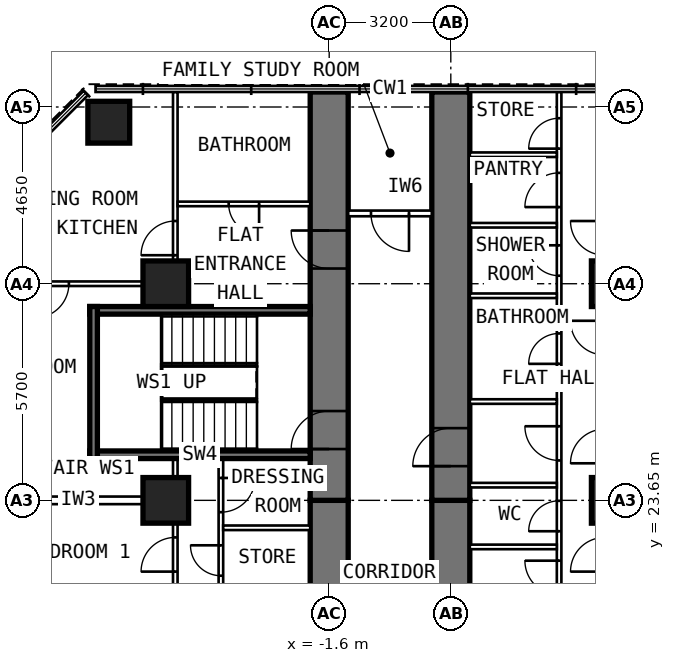
"""IFC4 building model, lengths in metres.
Left out: names, types, materials, properties, quantities, classifications, styles, units other than length and angle.
Written with IfcOpenShell. Run it as: python <this file> out.ifc"""

import sys

from ifc_helpers import new_model, si_unit, direction, frame, frame_2d, origin, origin_2d, place, context, subcontext, project, spatial, rectangle, extrude, element, fill, save


model = new_model("IFC4")
c1 = context("Model", 3, precision=1e-05, world=origin(), true_north=direction((0.0, 1.0)))
c2 = subcontext(c1, "Body", "Model", "MODEL_VIEW")
j1 = project(units=[si_unit("LENGTHUNIT", "METRE"), si_unit("PLANEANGLEUNIT", "RADIAN")], contexts=[c1])
p1 = place(None, origin())
s1 = spatial("IfcSite", under=j1, at=p1, CompositionType="ELEMENT")
p2 = place(p1, origin())
s2 = spatial("IfcBuilding", under=s1, at=p2, CompositionType="ELEMENT")
p3 = place(p2, frame((0.0, 0.0, 28.8)))
s3 = spatial("IfcBuildingStorey", under=s2, at=p3, CompositionType="ELEMENT", Elevation=28.8)
p4 = place(p3, frame((-7.4, 33.6, 0.0), z_axis=(0.0, 0.0, 1.0), x_axis=(0.0, 1.0, 0.0)))
e1 = element("IfcColumn", 1, at=p4, inside=s3, PredefinedType="COLUMN", context=c2, shape_type="SweptSolid", body=[
    extrude(rectangle(XDim=1.1, YDim=1.1, at=origin_2d()), origin(), (0.0, 0.0, 1.0), 3.6),
])
for number, where, z_axis, x_axis in (
    (2, (-5.9, 23.65, 0.0), (0.0, 0.0, 1.0), (0.0, 1.0, 0.0)),
    (3, (-5.9, 29.35, 0.0), (0.0, 0.0, 1.0), (0.0, 1.0, 0.0)),
    (4, (5.9, 23.65, 0.0), (0.0, 0.0, 1.0), (0.0, 1.0, 0.0)),
    (5, (5.9, 29.35, 0.0), (0.0, 0.0, 1.0), (0.0, 1.0, 0.0)),
):
    element("IfcColumn", number, at=place(p3, frame(where, z_axis=z_axis, x_axis=x_axis)), inside=s3, PredefinedType="COLUMN", context=c2, shape_type="SweptSolid", body=[
        extrude(rectangle(XDim=1.2, YDim=1.2, at=origin_2d()), origin(), (0.0, 0.0, 1.0), 3.6),
    ])
p5 = place(p3, frame((-1.6, 17.95, 0.0), z_axis=(0.0, 0.0, 1.0), x_axis=(0.0, 1.0, 0.0)))
e6 = element("IfcWall", 6, at=p5, inside=s3, PredefinedType="SHEAR", context=c2, shape_type="SweptSolid", body=[
    extrude(rectangle(XDim=5.7, YDim=1.0, at=frame_2d((2.85, 0.0))), origin(), (0.0, 0.0, 1.0), 3.6),
])
p6 = place(p3, frame((-1.6, 23.65, 0.0), z_axis=(0.0, 0.0, 1.0), x_axis=(0.0, 1.0, 0.0)))
e7 = element("IfcWall", 7, at=p6, inside=s3, PredefinedType="SHEAR", context=c2, shape_type="SweptSolid", body=[
    extrude(rectangle(XDim=10.745, YDim=1.0, at=frame_2d((5.373, 0.0))), origin(), (0.0, 0.0, 1.0), 3.6),
])
p7 = place(p6, frame((6.1, 0.0, 0.0)))
e8 = element("IfcOpeningElement", 8, at=p7, cuts=e7, PredefinedType="OPENING", context=c2, shape_type="SweptSolid", body=[
    extrude(rectangle(XDim=1.0, YDim=2.1, at=frame_2d((0.5, 1.05))), frame((0.0, 0.512, 0.0), z_axis=(0.0, -1.0, 0.0), x_axis=(1.0, 0.0, 0.0)), (0.0, 0.0, 1.0), 1.024),
])
p8 = place(p6, frame((1.35, 0.0, 0.0)))
e9 = element("IfcOpeningElement", 9, at=p8, cuts=e7, PredefinedType="OPENING", context=c2, shape_type="SweptSolid", body=[
    extrude(rectangle(XDim=1.0, YDim=2.1, at=frame_2d((0.5, 1.05))), frame((0.0, 0.512, 0.0), z_axis=(0.0, -1.0, 0.0), x_axis=(1.0, 0.0, 0.0)), (0.0, 0.0, 1.0), 1.024),
])
p9 = place(p3, frame((1.6, 17.95, 0.0), z_axis=(0.0, 0.0, 1.0), x_axis=(0.0, 1.0, 0.0)))
e10 = element("IfcWall", 10, at=p9, inside=s3, PredefinedType="SHEAR", context=c2, shape_type="SweptSolid", body=[
    extrude(rectangle(XDim=5.7, YDim=1.0, at=frame_2d((2.85, 0.0))), origin(), (0.0, 0.0, 1.0), 3.6),
])
p10 = place(p3, frame((1.6, 23.65, 0.0), z_axis=(0.0, 0.0, 1.0), x_axis=(0.0, 1.0, 0.0)))
e11 = element("IfcWall", 11, at=p10, inside=s3, PredefinedType="SHEAR", context=c2, shape_type="SweptSolid", body=[
    extrude(rectangle(XDim=10.745, YDim=1.0, at=frame_2d((5.373, 0.0))), origin(), (0.0, 0.0, 1.0), 3.6),
])
p11 = place(p10, frame((0.9, 0.0, 0.0)))
e12 = element("IfcOpeningElement", 12, at=p11, cuts=e11, PredefinedType="OPENING", context=c2, shape_type="SweptSolid", body=[
    extrude(rectangle(XDim=1.0, YDim=2.1, at=frame_2d((0.5, 1.05))), frame((0.0, 0.512, 0.0), z_axis=(0.0, -1.0, 0.0), x_axis=(1.0, 0.0, 0.0)), (0.0, 0.0, 1.0), 1.024),
])
p12 = place(p3, frame((-4.45, 10.1, 0.0), z_axis=(0.0, 0.0, 1.0), x_axis=(0.0, 1.0, 0.0)))
e13 = element("IfcWall", 13, at=p12, inside=s3, PredefinedType="PARTITIONING", context=c2, shape_type="SweptSolid", body=[
    extrude(rectangle(XDim=14.65, YDim=0.12, at=frame_2d((7.325, 0.0))), origin(), (0.0, 0.0, 1.0), 3.3),
])
p13 = place(p12, frame((1.54, 0.0, 0.0)))
e14 = element("IfcOpeningElement", 14, at=p13, cuts=e13, PredefinedType="OPENING", context=c2, shape_type="SweptSolid", body=[
    extrude(rectangle(XDim=0.9, YDim=2.1, at=frame_2d((0.45, 1.05))), frame((0.0, 0.072, 0.0), z_axis=(0.0, -1.0, 0.0), x_axis=(1.0, 0.0, 0.0)), (0.0, 0.0, 1.0), 0.144),
])
p14 = place(p12, frame((3.53, 0.0, 0.0)))
e15 = element("IfcOpeningElement", 15, at=p14, cuts=e13, PredefinedType="OPENING", context=c2, shape_type="SweptSolid", body=[
    extrude(rectangle(XDim=0.9, YDim=2.1, at=frame_2d((0.45, 1.05))), frame((0.0, 0.072, 0.0), z_axis=(0.0, -1.0, 0.0), x_axis=(1.0, 0.0, 0.0)), (0.0, 0.0, 1.0), 0.144),
])
p15 = place(p12, frame((5.971, 0.0, 0.0)))
e16 = element("IfcOpeningElement", 16, at=p15, cuts=e13, PredefinedType="OPENING", context=c2, shape_type="SweptSolid", body=[
    extrude(rectangle(XDim=0.8, YDim=2.1, at=frame_2d((0.4, 1.05))), frame((0.0, 0.072, 0.0), z_axis=(0.0, -1.0, 0.0), x_axis=(1.0, 0.0, 0.0)), (0.0, 0.0, 1.0), 0.144),
])
p16 = place(p12, frame((8.074, 0.0, 0.0)))
e17 = element("IfcOpeningElement", 17, at=p16, cuts=e13, PredefinedType="OPENING", context=c2, shape_type="SweptSolid", body=[
    extrude(rectangle(XDim=0.9, YDim=2.1, at=frame_2d((0.45, 1.05))), frame((0.0, 0.072, 0.0), z_axis=(0.0, -1.0, 0.0), x_axis=(1.0, 0.0, 0.0)), (0.0, 0.0, 1.0), 0.144),
])
p17 = place(p12, frame((9.845, 0.0, 0.0)))
e18 = element("IfcOpeningElement", 18, at=p17, cuts=e13, PredefinedType="OPENING", context=c2, shape_type="SweptSolid", body=[
    extrude(rectangle(XDim=0.8, YDim=2.1, at=frame_2d((0.4, 1.05))), frame((0.0, 0.072, 0.0), z_axis=(0.0, -1.0, 0.0), x_axis=(1.0, 0.0, 0.0)), (0.0, 0.0, 1.0), 0.144),
])
p18 = place(p12, frame((11.567, 0.0, 0.0)))
e19 = element("IfcOpeningElement", 19, at=p18, cuts=e13, PredefinedType="OPENING", context=c2, shape_type="SweptSolid", body=[
    extrude(rectangle(XDim=0.8, YDim=2.1, at=frame_2d((0.4, 1.05))), frame((0.0, 0.072, 0.0), z_axis=(0.0, -1.0, 0.0), x_axis=(1.0, 0.0, 0.0)), (0.0, 0.0, 1.0), 0.144),
])
p19 = place(p12, frame((13.239, 0.0, 0.0)))
e20 = element("IfcOpeningElement", 20, at=p19, cuts=e13, PredefinedType="OPENING", context=c2, shape_type="SweptSolid", body=[
    extrude(rectangle(XDim=0.9, YDim=2.1, at=frame_2d((0.45, 1.05))), frame((0.0, 0.072, 0.0), z_axis=(0.0, -1.0, 0.0), x_axis=(1.0, 0.0, 0.0)), (0.0, 0.0, 1.0), 0.144),
])
p20 = place(p3, frame((-5.65, 9.6, 0.0), z_axis=(0.0, 0.0, 1.0), x_axis=(0.0, 1.0, 0.0)))
e21 = element("IfcWall", 21, at=p20, inside=s3, PredefinedType="PARTITIONING", context=c2, shape_type="SweptSolid", body=[
    extrude(rectangle(XDim=15.15, YDim=0.12, at=frame_2d((7.575, 0.0))), origin(), (0.0, 0.0, 1.0), 3.3),
])
p21 = place(p20, frame((5.05, 0.0, 0.0)))
e22 = element("IfcOpeningElement", 22, at=p21, cuts=e21, PredefinedType="OPENING", context=c2, shape_type="SweptSolid", body=[
    extrude(rectangle(XDim=0.9, YDim=2.1, at=frame_2d((0.45, 1.05))), frame((0.0, 0.072, 0.0), z_axis=(0.0, -1.0, 0.0), x_axis=(1.0, 0.0, 0.0)), (0.0, 0.0, 1.0), 0.144),
])
p22 = place(p20, frame((9.325, 0.0, 0.0)))
e23 = element("IfcOpeningElement", 23, at=p22, cuts=e21, PredefinedType="OPENING", context=c2, shape_type="SweptSolid", body=[
    extrude(rectangle(XDim=0.9, YDim=2.1, at=frame_2d((0.45, 1.05))), frame((0.0, 0.072, 0.0), z_axis=(0.0, -1.0, 0.0), x_axis=(1.0, 0.0, 0.0)), (0.0, 0.0, 1.0), 0.144),
])
p23 = place(p20, frame((12.175, 0.0, 0.0)))
e24 = element("IfcOpeningElement", 24, at=p23, cuts=e21, PredefinedType="OPENING", context=c2, shape_type="SweptSolid", body=[
    extrude(rectangle(XDim=0.9, YDim=2.1, at=frame_2d((0.45, 1.05))), frame((0.0, 0.072, 0.0), z_axis=(0.0, -1.0, 0.0), x_axis=(1.0, 0.0, 0.0)), (0.0, 0.0, 1.0), 0.144),
])
p24 = place(p3, frame((-2.1, 22.928, 0.0), z_axis=(0.0, 0.0, 1.0), x_axis=(-1.0, 0.0, 0.0)))
e25 = element("IfcWall", 25, at=p24, inside=s3, PredefinedType="PARTITIONING", context=c2, shape_type="SweptSolid", body=[
    extrude(rectangle(XDim=2.29, YDim=0.12, at=frame_2d((1.145, 0.0))), origin(), (0.0, 0.0, 1.0), 3.3),
])
p25 = place(p3, frame((-5.71, 23.65, 0.0), z_axis=(0.0, 0.0, 1.0), x_axis=(-1.0, 0.0, 0.0)))
e26 = element("IfcWall", 26, at=p25, inside=s3, PredefinedType="PARTITIONING", context=c2, shape_type="SweptSolid", body=[
    extrude(rectangle(XDim=4.99, YDim=0.2, at=frame_2d((2.495, 0.0))), origin(), (0.0, 0.0, 1.0), 3.3),
])
p26 = place(p3, frame((-5.71, 29.35, 0.0), z_axis=(0.0, 0.0, 1.0), x_axis=(-1.0, 0.0, 0.0)))
e27 = element("IfcWall", 27, at=p26, inside=s3, PredefinedType="PARTITIONING", context=c2, shape_type="SweptSolid", body=[
    extrude(rectangle(XDim=4.99, YDim=0.12, at=frame_2d((2.495, 0.0))), origin(), (0.0, 0.0, 1.0), 2.3),
])
p27 = place(p26, frame((2.74, 0.0, 0.0)))
e28 = element("IfcOpeningElement", 28, at=p27, cuts=e27, PredefinedType="OPENING", context=c2, shape_type="SweptSolid", body=[
    extrude(rectangle(XDim=0.9, YDim=2.1, at=frame_2d((0.45, 1.05))), frame((0.0, 0.072, 0.0), z_axis=(0.0, -1.0, 0.0), x_axis=(1.0, 0.0, 0.0)), (0.0, 0.0, 1.0), 0.144),
])
p28 = place(p3, frame((-5.65, 28.95, 0.0), z_axis=(0.0, 0.0, 1.0), x_axis=(0.0, 1.0, 0.0)))
e29 = element("IfcWall", 29, at=p28, inside=s3, PredefinedType="PARTITIONING", context=c2, shape_type="SweptSolid", body=[
    extrude(rectangle(XDim=5.445, YDim=0.12, at=frame_2d((2.723, 0.0))), origin(), (0.0, 0.0, 1.0), 3.3),
])
p29 = place(p28, frame((1.15, 0.0, 0.0)))
e30 = element("IfcOpeningElement", 30, at=p29, cuts=e29, PredefinedType="OPENING", context=c2, shape_type="SweptSolid", body=[
    extrude(rectangle(XDim=0.9, YDim=2.1, at=frame_2d((0.45, 1.05))), frame((0.0, 0.072, 0.0), z_axis=(0.0, -1.0, 0.0), x_axis=(1.0, 0.0, 0.0)), (0.0, 0.0, 1.0), 0.144),
])
p30 = place(p3, frame((-2.1, 31.45, 0.0), z_axis=(0.0, 0.0, 1.0), x_axis=(-1.0, 0.0, 0.0)))
e31 = element("IfcWall", 31, at=p30, inside=s3, PredefinedType="PARTITIONING", context=c2, shape_type="SweptSolid", body=[
    extrude(rectangle(XDim=3.49, YDim=0.12, at=frame_2d((1.745, 0.0))), origin(), (0.0, 0.0, 1.0), 3.3),
])
p31 = place(p30, frame((1.345, 0.0, 0.0)))
e32 = element("IfcOpeningElement", 32, at=p31, cuts=e31, PredefinedType="OPENING", context=c2, shape_type="SweptSolid", body=[
    extrude(rectangle(XDim=0.8, YDim=2.1, at=frame_2d((0.4, 1.05))), frame((0.0, 0.072, 0.0), z_axis=(0.0, -1.0, 0.0), x_axis=(1.0, 0.0, 0.0)), (0.0, 0.0, 1.0), 0.144),
])
p32 = place(p3, frame((4.45, 20.9, 0.0), z_axis=(0.0, 0.0, 1.0), x_axis=(0.0, 1.0, 0.0)))
e33 = element("IfcWall", 33, at=p32, inside=s3, PredefinedType="PARTITIONING", context=c2, shape_type="SweptSolid", body=[
    extrude(rectangle(XDim=13.495, YDim=0.12, at=frame_2d((6.748, 0.0))), origin(), (0.0, 0.0, 1.0), 3.3),
])
p33 = place(p32, frame((0.262, 0.0, 0.0)))
e34 = element("IfcOpeningElement", 34, at=p33, cuts=e33, PredefinedType="OPENING", context=c2, shape_type="SweptSolid", body=[
    extrude(rectangle(XDim=0.9, YDim=2.1, at=frame_2d((0.45, 1.05))), frame((0.0, 0.072, 0.0), z_axis=(0.0, -1.0, 0.0), x_axis=(1.0, 0.0, 0.0)), (0.0, 0.0, 1.0), 0.144),
])
p34 = place(p32, frame((1.938, 0.0, 0.0)))
e35 = element("IfcOpeningElement", 35, at=p34, cuts=e33, PredefinedType="OPENING", context=c2, shape_type="SweptSolid", body=[
    extrude(rectangle(XDim=0.8, YDim=2.1, at=frame_2d((0.4, 1.05))), frame((0.0, 0.072, 0.0), z_axis=(0.0, -1.0, 0.0), x_axis=(1.0, 0.0, 0.0)), (0.0, 0.0, 1.0), 0.144),
])
p35 = place(p32, frame((3.8, 0.0, 0.0)))
e36 = element("IfcOpeningElement", 36, at=p35, cuts=e33, PredefinedType="OPENING", context=c2, shape_type="SweptSolid", body=[
    extrude(rectangle(XDim=0.9, YDim=2.1, at=frame_2d((0.45, 1.05))), frame((0.0, 0.072, 0.0), z_axis=(0.0, -1.0, 0.0), x_axis=(1.0, 0.0, 0.0)), (0.0, 0.0, 1.0), 0.144),
])
p36 = place(p32, frame((6.342, 0.0, 0.0)))
e37 = element("IfcOpeningElement", 37, at=p36, cuts=e33, PredefinedType="OPENING", context=c2, shape_type="SweptSolid", body=[
    extrude(rectangle(XDim=0.8, YDim=2.1, at=frame_2d((0.4, 1.05))), frame((0.0, 0.072, 0.0), z_axis=(0.0, -1.0, 0.0), x_axis=(1.0, 0.0, 0.0)), (0.0, 0.0, 1.0), 0.144),
])
p37 = place(p32, frame((8.661, 0.0, 0.0)))
e38 = element("IfcOpeningElement", 38, at=p37, cuts=e33, PredefinedType="OPENING", context=c2, shape_type="SweptSolid", body=[
    extrude(rectangle(XDim=0.8, YDim=2.1, at=frame_2d((0.4, 1.05))), frame((0.0, 0.072, 0.0), z_axis=(0.0, -1.0, 0.0), x_axis=(1.0, 0.0, 0.0)), (0.0, 0.0, 1.0), 0.144),
])
p38 = place(p32, frame((10.467, 0.0, 0.0)))
e39 = element("IfcOpeningElement", 39, at=p38, cuts=e33, PredefinedType="OPENING", context=c2, shape_type="SweptSolid", body=[
    extrude(rectangle(XDim=0.9, YDim=2.1, at=frame_2d((0.45, 1.05))), frame((0.0, 0.072, 0.0), z_axis=(0.0, -1.0, 0.0), x_axis=(1.0, 0.0, 0.0)), (0.0, 0.0, 1.0), 0.144),
])
p39 = place(p32, frame((12.004, 0.0, 0.0)))
e40 = element("IfcOpeningElement", 40, at=p39, cuts=e33, PredefinedType="OPENING", context=c2, shape_type="SweptSolid", body=[
    extrude(rectangle(XDim=0.8, YDim=2.1, at=frame_2d((0.4, 1.05))), frame((0.0, 0.072, 0.0), z_axis=(0.0, -1.0, 0.0), x_axis=(1.0, 0.0, 0.0)), (0.0, 0.0, 1.0), 0.144),
])
for number, where, z_axis, x_axis in (
    (41, (2.1, 22.425, 0.0), (0.0, 0.0, 1.0), (1.0, 0.0, 0.0)),
    (42, (2.1, 24.05, 0.0), (0.0, 0.0, 1.0), (1.0, 0.0, 0.0)),
    (43, (2.1, 26.25, 0.0), (0.0, 0.0, 1.0), (1.0, 0.0, 0.0)),
):
    element("IfcWall", number, at=place(p3, frame(where, z_axis=z_axis, x_axis=x_axis)), inside=s3, PredefinedType="PARTITIONING", context=c2, shape_type="SweptSolid", body=[
        extrude(rectangle(XDim=2.29, YDim=0.12, at=frame_2d((1.145, 0.0))), origin(), (0.0, 0.0, 1.0), 3.3),
    ])
p40 = place(p3, frame((2.1, 29.033, 0.0), z_axis=(0.0, 0.0, 1.0), x_axis=(1.0, 0.0, 0.0)))
e44 = element("IfcWall", 44, at=p40, inside=s3, PredefinedType="PARTITIONING", context=c2, shape_type="SweptSolid", body=[
    extrude(rectangle(XDim=2.29, YDim=0.12, at=frame_2d((1.145, 0.0))), origin(), (0.0, 0.0, 1.0), 2.3),
])
for number, where, z_axis, x_axis in (
    (45, (2.1, 30.889, 0.0), (0.0, 0.0, 1.0), (1.0, 0.0, 0.0)),
    (46, (2.1, 32.744, 0.0), (0.0, 0.0, 1.0), (1.0, 0.0, 0.0)),
):
    element("IfcWall", number, at=place(p3, frame(where, z_axis=z_axis, x_axis=x_axis)), inside=s3, PredefinedType="PARTITIONING", context=c2, shape_type="SweptSolid", body=[
        extrude(rectangle(XDim=2.29, YDim=0.12, at=frame_2d((1.145, 0.0))), origin(), (0.0, 0.0, 1.0), 3.3),
    ])
p41 = place(p3, frame((1.1, 31.2, 0.0), z_axis=(0.0, 0.0, 1.0), x_axis=(-1.0, 0.0, 0.0)))
e47 = element("IfcWall", 47, at=p41, inside=s3, PredefinedType="PARTITIONING", context=c2, shape_type="SweptSolid", body=[
    extrude(rectangle(XDim=2.2, YDim=0.15, at=frame_2d((1.1, 0.0))), origin(), (0.0, 0.0, 1.0), 3.3),
])
p42 = place(p41, frame((0.6, 0.0, 0.0)))
e48 = element("IfcOpeningElement", 48, at=p42, cuts=e47, PredefinedType="OPENING", context=c2, shape_type="SweptSolid", body=[
    extrude(rectangle(XDim=1.0, YDim=2.1, at=frame_2d((0.5, 1.05))), frame((0.0, 0.087, 0.0), z_axis=(0.0, -1.0, 0.0), x_axis=(1.0, 0.0, 0.0)), (0.0, 0.0, 1.0), 0.174),
])
for number, where, z_axis, x_axis in (
    (49, (-2.1, 24.85, 0.0), (0.0, 0.0, 1.0), (-1.0, 0.0, 0.0)),
    (50, (-2.1, 28.65, 0.0), (0.0, 0.0, 1.0), (-1.0, 0.0, 0.0)),
):
    element("IfcWall", number, at=place(p3, frame(where, z_axis=z_axis, x_axis=x_axis)), inside=s3, PredefinedType="SHEAR", context=c2, shape_type="SweptSolid", body=[
        extrude(rectangle(XDim=5.8, YDim=0.2, at=frame_2d((2.9, 0.0))), origin(), (0.0, 0.0, 1.0), 3.28),
    ])
p43 = place(p3, frame((-7.8, 24.75, 0.0), z_axis=(0.0, 0.0, 1.0), x_axis=(0.0, 1.0, 0.0)))
e51 = element("IfcWall", 51, at=p43, inside=s3, PredefinedType="SHEAR", context=c2, shape_type="SweptSolid", body=[
    extrude(rectangle(XDim=4.0, YDim=0.2, at=frame_2d((2.0, 0.0))), origin(), (0.0, 0.0, 1.0), 3.28),
])
p44 = place(p23, origin())
e52 = element("IfcDoor", 52, at=p44, inside=s3, OperationType="SINGLE_SWING_LEFT", PredefinedType="DOOR", context=c2, shape_type="SweptSolid", body=[
    extrude(rectangle(XDim=0.9, YDim=2.1, at=frame_2d((0.45, 1.05))), frame((0.0, 0.025, 0.0), z_axis=(0.0, -1.0, 0.0), x_axis=(1.0, 0.0, 0.0)), (0.0, 0.0, 1.0), 0.05),
])
fill(e24, e52)
p45 = place(p18, origin())
e53 = element("IfcDoor", 53, at=p45, inside=s3, OperationType="SINGLE_SWING_RIGHT", PredefinedType="DOOR", context=c2, shape_type="SweptSolid", body=[
    extrude(rectangle(XDim=0.8, YDim=2.1, at=frame_2d((0.4, 1.05))), frame((0.0, 0.025, 0.0), z_axis=(0.0, -1.0, 0.0), x_axis=(1.0, 0.0, 0.0)), (0.0, 0.0, 1.0), 0.05),
])
fill(e19, e53)
p46 = place(p19, frame((0.9, 0.0, 0.0), z_axis=(0.0, 0.0, 1.0), x_axis=(-1.0, 0.0, 0.0)))
e54 = element("IfcDoor", 54, at=p46, inside=s3, OperationType="SINGLE_SWING_LEFT", PredefinedType="DOOR", context=c2, shape_type="SweptSolid", body=[
    extrude(rectangle(XDim=0.9, YDim=2.1, at=frame_2d((0.45, 1.05))), frame((0.0, 0.025, 0.0), z_axis=(0.0, -1.0, 0.0), x_axis=(1.0, 0.0, 0.0)), (0.0, 0.0, 1.0), 0.05),
])
fill(e20, e54)
p47 = place(p27, origin())
e55 = element("IfcDoor", 55, at=p47, inside=s3, OperationType="SINGLE_SWING_RIGHT", PredefinedType="DOOR", context=c2, shape_type="SweptSolid", body=[
    extrude(rectangle(XDim=0.9, YDim=2.1, at=frame_2d((0.45, 1.05))), frame((0.0, 0.025, 0.0), z_axis=(0.0, -1.0, 0.0), x_axis=(1.0, 0.0, 0.0)), (0.0, 0.0, 1.0), 0.05),
])
fill(e28, e55)
p48 = place(p29, origin())
e56 = element("IfcDoor", 56, at=p48, inside=s3, OperationType="SINGLE_SWING_LEFT", PredefinedType="DOOR", context=c2, shape_type="SweptSolid", body=[
    extrude(rectangle(XDim=0.9, YDim=2.1, at=frame_2d((0.45, 1.05))), frame((0.0, 0.025, 0.0), z_axis=(0.0, -1.0, 0.0), x_axis=(1.0, 0.0, 0.0)), (0.0, 0.0, 1.0), 0.05),
])
fill(e30, e56)
p49 = place(p31, origin())
e57 = element("IfcDoor", 57, at=p49, inside=s3, OperationType="SINGLE_SWING_LEFT", PredefinedType="DOOR", context=c2, shape_type="SweptSolid", body=[
    extrude(rectangle(XDim=0.8, YDim=2.1, at=frame_2d((0.4, 1.05))), frame((0.0, 0.025, 0.0), z_axis=(0.0, -1.0, 0.0), x_axis=(1.0, 0.0, 0.0)), (0.0, 0.0, 1.0), 0.05),
])
fill(e32, e57)
p50 = place(p7, origin())
e58 = element("IfcDoor", 58, at=p50, inside=s3, OperationType="SINGLE_SWING_RIGHT", PredefinedType="DOOR", context=c2, shape_type="SweptSolid", body=[
    extrude(rectangle(XDim=1.0, YDim=2.1, at=frame_2d((0.5, 1.05))), frame((0.0, 0.25, 0.0), z_axis=(0.0, -1.0, 0.0), x_axis=(1.0, 0.0, 0.0)), (0.0, 0.0, 1.0), 0.5),
])
fill(e8, e58)
p51 = place(p11, origin())
e59 = element("IfcDoor", 59, at=p51, inside=s3, OperationType="SINGLE_SWING_LEFT", PredefinedType="DOOR", context=c2, shape_type="SweptSolid", body=[
    extrude(rectangle(XDim=1.0, YDim=2.1, at=frame_2d((0.5, 1.05))), frame((0.0, 0.25, 0.0), z_axis=(0.0, -1.0, 0.0), x_axis=(1.0, 0.0, 0.0)), (0.0, 0.0, 1.0), 0.5),
])
fill(e12, e59)
p52 = place(p33, origin())
e60 = element("IfcDoor", 60, at=p52, inside=s3, OperationType="SINGLE_SWING_RIGHT", PredefinedType="DOOR", context=c2, shape_type="SweptSolid", body=[
    extrude(rectangle(XDim=0.9, YDim=2.1, at=frame_2d((0.45, 1.05))), frame((0.0, 0.025, 0.0), z_axis=(0.0, -1.0, 0.0), x_axis=(1.0, 0.0, 0.0)), (0.0, 0.0, 1.0), 0.05),
])
fill(e34, e60)
p53 = place(p34, origin())
e61 = element("IfcDoor", 61, at=p53, inside=s3, OperationType="SINGLE_SWING_LEFT", PredefinedType="DOOR", context=c2, shape_type="SweptSolid", body=[
    extrude(rectangle(XDim=0.8, YDim=2.1, at=frame_2d((0.4, 1.05))), frame((0.0, 0.025, 0.0), z_axis=(0.0, -1.0, 0.0), x_axis=(1.0, 0.0, 0.0)), (0.0, 0.0, 1.0), 0.05),
])
fill(e35, e61)
p54 = place(p35, origin())
e62 = element("IfcDoor", 62, at=p54, inside=s3, OperationType="SINGLE_SWING_RIGHT", PredefinedType="DOOR", context=c2, shape_type="SweptSolid", body=[
    extrude(rectangle(XDim=0.9, YDim=2.1, at=frame_2d((0.45, 1.05))), frame((0.0, 0.025, 0.0), z_axis=(0.0, -1.0, 0.0), x_axis=(1.0, 0.0, 0.0)), (0.0, 0.0, 1.0), 0.05),
])
fill(e36, e62)
p55 = place(p36, origin())
e63 = element("IfcDoor", 63, at=p55, inside=s3, OperationType="SINGLE_SWING_LEFT", PredefinedType="DOOR", context=c2, shape_type="SweptSolid", body=[
    extrude(rectangle(XDim=0.8, YDim=2.1, at=frame_2d((0.4, 1.05))), frame((0.0, 0.025, 0.0), z_axis=(0.0, -1.0, 0.0), x_axis=(1.0, 0.0, 0.0)), (0.0, 0.0, 1.0), 0.05),
])
fill(e37, e63)
p56 = place(p37, origin())
e64 = element("IfcDoor", 64, at=p56, inside=s3, OperationType="SINGLE_SWING_RIGHT", PredefinedType="DOOR", context=c2, shape_type="SweptSolid", body=[
    extrude(rectangle(XDim=0.8, YDim=2.1, at=frame_2d((0.4, 1.05))), frame((0.0, 0.025, 0.0), z_axis=(0.0, -1.0, 0.0), x_axis=(1.0, 0.0, 0.0)), (0.0, 0.0, 1.0), 0.05),
])
fill(e38, e64)
p57 = place(p38, origin())
e65 = element("IfcDoor", 65, at=p57, inside=s3, OperationType="SINGLE_SWING_LEFT", PredefinedType="DOOR", context=c2, shape_type="SweptSolid", body=[
    extrude(rectangle(XDim=0.9, YDim=2.1, at=frame_2d((0.45, 1.05))), frame((0.0, 0.025, 0.0), z_axis=(0.0, -1.0, 0.0), x_axis=(1.0, 0.0, 0.0)), (0.0, 0.0, 1.0), 0.05),
])
fill(e39, e65)
p58 = place(p39, origin())
e66 = element("IfcDoor", 66, at=p58, inside=s3, OperationType="SINGLE_SWING_LEFT", PredefinedType="DOOR", context=c2, shape_type="SweptSolid", body=[
    extrude(rectangle(XDim=0.8, YDim=2.1, at=frame_2d((0.4, 1.05))), frame((0.0, 0.025, 0.0), z_axis=(0.0, -1.0, 0.0), x_axis=(1.0, 0.0, 0.0)), (0.0, 0.0, 1.0), 0.05),
])
fill(e40, e66)
p59 = place(p42, origin())
e67 = element("IfcDoor", 67, at=p59, inside=s3, OperationType="SINGLE_SWING_LEFT", PredefinedType="DOOR", context=c2, shape_type="SweptSolid", body=[
    extrude(rectangle(XDim=1.0, YDim=2.1, at=frame_2d((0.5, 1.05))), frame((0.0, 0.025, 0.0), z_axis=(0.0, -1.0, 0.0), x_axis=(1.0, 0.0, 0.0)), (0.0, 0.0, 1.0), 0.05),
])
fill(e48, e67)
p60 = place(p8, origin())
e68 = element("IfcDoor", 68, at=p60, inside=s3, OperationType="SINGLE_SWING_LEFT", PredefinedType="DOOR", context=c2, shape_type="SweptSolid", body=[
    extrude(rectangle(XDim=1.0, YDim=2.1, at=frame_2d((0.5, 1.05))), frame((0.0, 0.25, 0.0), z_axis=(0.0, -1.0, 0.0), x_axis=(1.0, 0.0, 0.0)), (0.0, 0.0, 1.0), 0.5),
])
fill(e9, e68)
save(model, sys.argv[1])
